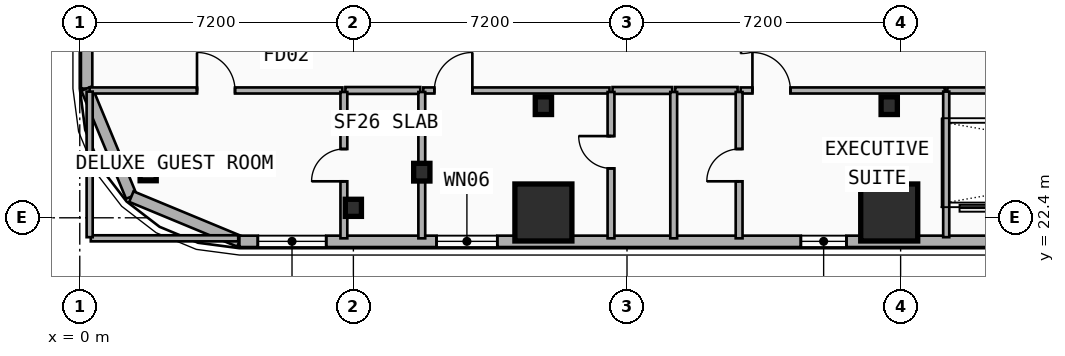
"""IFC4 building model, lengths in metres.
Left out: names, types, materials, properties, quantities, classifications, styles, units other than length and angle.
Written with IfcOpenShell. Run it as: python <this file> out.ifc"""

import sys

from ifc_helpers import new_model, si_unit, direction, frame, frame_2d, origin, origin_2d, place, context, subcontext, project, spatial, rectangle, i_section, extrude, element, fill, save


model = new_model("IFC4")
c1 = context("Model", 3, precision=1e-05, world=origin(), true_north=direction((0.0, 1.0)))
c2 = subcontext(c1, "Body", "Model", "MODEL_VIEW")
j1 = project(units=[si_unit("LENGTHUNIT", "METRE"), si_unit("PLANEANGLEUNIT", "RADIAN")], contexts=[c1])
p1 = place(None, origin())
s1 = spatial("IfcSite", under=j1, at=p1, CompositionType="ELEMENT")
p2 = place(p1, origin())
s2 = spatial("IfcBuilding", under=s1, at=p2, CompositionType="ELEMENT")
p3 = place(p2, frame((0.0, 0.0, 39.5)))
s3 = spatial("IfcBuildingStorey", under=s2, at=p3, CompositionType="ELEMENT", Elevation=39.5)
for number, where, z_axis, x_axis in (
    (1, (12.2, 25.35, 0.0), (0.0, 0.0, 1.0), (1.0, 0.0, 0.0)),
    (2, (21.3, 25.35, 0.0), (0.0, 0.0, 1.0), (1.0, 0.0, 0.0)),
):
    element("IfcColumn", number, at=place(p3, frame(where, z_axis=z_axis, x_axis=x_axis)), inside=s3, PredefinedType="COLUMN", context=c2, shape_type="SweptSolid", body=[
        extrude(i_section(OverallWidth=0.428, OverallDepth=0.465, WebThickness=0.045, FlangeThickness=0.073, FilletRadius=0.015, at=origin_2d()), origin(), (0.0, 0.0, 1.0), 3.5),
    ])
for number, where, z_axis, x_axis in (
    (3, (12.2, 22.648, 0.0), (0.0, -0.09, 0.996), (1.0, 0.0, 0.0)),
    (4, (21.3, 22.648, 0.0), (0.0, -0.09, 0.996), (1.0, 0.0, 0.0)),
):
    element("IfcColumn", number, at=place(p3, frame(where, z_axis=z_axis, x_axis=x_axis)), inside=s3, PredefinedType="COLUMN", context=c2, shape_type="SweptSolid", body=[
        extrude(rectangle(XDim=1.5, YDim=1.5, at=origin_2d()), origin(), (0.0, 0.0, 1.0), 3.514),
    ])
p4 = place(p3, frame((9.0, 23.6, 0.0), z_axis=(0.0, 0.0, 1.0), x_axis=(1.0, 0.0, 0.0)))
e5 = element("IfcColumn", 5, at=p4, inside=s3, PredefinedType="COLUMN", context=c2, shape_type="SweptSolid", body=[
    extrude(i_section(OverallWidth=0.428, OverallDepth=0.465, WebThickness=0.045, FlangeThickness=0.073, FilletRadius=0.015, at=origin_2d()), origin(), (0.0, 0.0, 1.0), 3.5),
])
p5 = place(p3, frame((1.8, 23.6, 0.0), z_axis=(0.0, 0.0, 1.0), x_axis=(1.0, 0.0, 0.0)))
e6 = element("IfcColumn", 6, at=p5, inside=s3, PredefinedType="COLUMN", context=c2, shape_type="SweptSolid", body=[
    extrude(i_section(OverallWidth=0.424, OverallDepth=0.45, WebThickness=0.041, FlangeThickness=0.065, FilletRadius=0.015, at=origin_2d()), origin(), (0.0, 0.0, 1.0), 3.5),
])
p6 = place(p3, frame((7.2, 22.758, 0.0), z_axis=(0.0, -0.079891690793, 0.996803550226), x_axis=(1.0, 0.0, 0.0)))
e7 = element("IfcColumn", 7, at=p6, inside=s3, PredefinedType="COLUMN", context=c2, shape_type="SweptSolid", body=[
    extrude(i_section(OverallWidth=0.424, OverallDepth=0.45, WebThickness=0.041, FlangeThickness=0.065, FilletRadius=0.015, at=origin_2d()), origin(), (0.0, 0.0, 1.0), 3.511),
])
p7 = place(p3, frame((0.18, 25.8, 0.0), z_axis=(0.0, 0.0, 1.0), x_axis=(0.0, 1.0, 0.0)))
e8 = element("IfcWall", 8, at=p7, inside=s3, PredefinedType="SOLIDWALL", context=c2, shape_type="SweptSolid", body=[
    extrude(rectangle(XDim=15.2, YDim=0.3, at=frame_2d((7.6, 0.0))), origin(), (0.0, 0.0, 1.0), 3.24),
])
p8 = place(p7, frame((2.67, 0.0, 0.48)))
e9 = element("IfcOpeningElement", 9, at=p8, cuts=e8, PredefinedType="OPENING", context=c2, shape_type="SweptSolid", body=[
    extrude(rectangle(XDim=1.4, YDim=1.8, at=frame_2d((0.7, 0.9))), frame((0.0, 0.16, 0.0), z_axis=(0.0, -1.0, 0.0), x_axis=(1.0, 0.0, 0.0)), (0.0, 0.0, 1.0), 0.32),
])
p9 = place(p7, frame((7.709, 0.0, 0.48)))
e10 = element("IfcOpeningElement", 10, at=p9, cuts=e8, PredefinedType="OPENING", context=c2, shape_type="SweptSolid", body=[
    extrude(rectangle(XDim=1.4, YDim=1.8, at=frame_2d((0.7, 0.9))), frame((0.0, 0.16, 0.0), z_axis=(0.0, -1.0, 0.0), x_axis=(1.0, 0.0, 0.0)), (0.0, 0.0, 1.0), 0.32),
])
for number, where, z_axis, x_axis in (
    (11, (1.357, 22.958, 0.0), (0.0, 0.0, 1.0), (-0.383, 0.924, 0.0)),
    (12, (4.2, 21.78, 0.0), (0.0, 0.0, 1.0), (-0.924, 0.383, 0.0)),
):
    element("IfcWall", number, at=place(p3, frame(where, z_axis=z_axis, x_axis=x_axis)), inside=s3, PredefinedType="SOLIDWALL", context=c2, shape_type="SweptSolid", body=[
        extrude(rectangle(XDim=3.077, YDim=0.3, at=frame_2d((1.538, 0.0))), origin(), (0.0, 0.0, 1.0), 3.24),
    ])
p10 = place(p3, frame((53.4, 21.78, 0.0), z_axis=(0.0, 0.0, 1.0), x_axis=(-1.0, 0.0, 0.0)))
e13 = element("IfcWall", 13, at=p10, inside=s3, PredefinedType="SOLIDWALL", context=c2, shape_type="SweptSolid", body=[
    extrude(rectangle(XDim=49.2, YDim=0.3, at=frame_2d((24.6, 0.0))), origin(), (0.0, 0.0, 1.0), 3.24),
])
p11 = place(p10, frame((46.915, 0.0, 0.65)))
e14 = element("IfcOpeningElement", 14, at=p11, cuts=e13, PredefinedType="OPENING", context=c2, shape_type="SweptSolid", body=[
    extrude(rectangle(XDim=1.8, YDim=1.8, at=frame_2d((0.9, 0.9))), frame((0.0, 0.16, 0.0), z_axis=(0.0, -1.0, 0.0), x_axis=(1.0, 0.0, 0.0)), (0.0, 0.0, 1.0), 0.32),
])
p12 = place(p10, frame((42.413, 0.0, 0.48)))
e15 = element("IfcOpeningElement", 15, at=p12, cuts=e13, PredefinedType="OPENING", context=c2, shape_type="SweptSolid", body=[
    extrude(rectangle(XDim=1.6, YDim=1.95, at=frame_2d((0.8, 0.975))), frame((0.0, 0.16, 0.0), z_axis=(0.0, -1.0, 0.0), x_axis=(1.0, 0.0, 0.0)), (0.0, 0.0, 1.0), 0.32),
])
p13 = place(p10, frame((33.226, 0.0, 0.48)))
e16 = element("IfcOpeningElement", 16, at=p13, cuts=e13, PredefinedType="OPENING", context=c2, shape_type="SweptSolid", body=[
    extrude(rectangle(XDim=1.2, YDim=1.5, at=frame_2d((0.6, 0.75))), frame((0.0, 0.16, 0.0), z_axis=(0.0, -1.0, 0.0), x_axis=(1.0, 0.0, 0.0)), (0.0, 0.0, 1.0), 0.32),
])
p14 = place(p10, frame((14.373, 0.0, 1.48)))
e17 = element("IfcOpeningElement", 17, at=p14, cuts=e13, PredefinedType="OPENING", context=c2, shape_type="SweptSolid", body=[
    extrude(rectangle(XDim=1.1, YDim=1.05, at=frame_2d((0.55, 0.525))), frame((0.0, 0.16, 0.0), z_axis=(0.0, -1.0, 0.0), x_axis=(1.0, 0.0, 0.0)), (0.0, 0.0, 1.0), 0.32),
])
p15 = place(p10, frame((5.187, 0.0, 0.48)))
e18 = element("IfcOpeningElement", 18, at=p15, cuts=e13, PredefinedType="OPENING", context=c2, shape_type="SweptSolid", body=[
    extrude(rectangle(XDim=1.6, YDim=1.95, at=frame_2d((0.8, 0.975))), frame((0.0, 0.16, 0.0), z_axis=(0.0, -1.0, 0.0), x_axis=(1.0, 0.0, 0.0)), (0.0, 0.0, 1.0), 0.32),
])
p16 = place(p10, frame((0.485, 0.0, 0.65)))
e19 = element("IfcOpeningElement", 19, at=p16, cuts=e13, PredefinedType="OPENING", context=c2, shape_type="SweptSolid", body=[
    extrude(rectangle(XDim=1.8, YDim=1.8, at=frame_2d((0.9, 0.9))), frame((0.0, 0.16, 0.0), z_axis=(0.0, -1.0, 0.0), x_axis=(1.0, 0.0, 0.0)), (0.0, 0.0, 1.0), 0.32),
])
p17 = place(p3, frame((0.26, 25.75, 0.0), z_axis=(0.0, 0.0, 1.0), x_axis=(1.0, 0.0, 0.0)))
e20 = element("IfcWall", 20, at=p17, inside=s3, PredefinedType="PARTITIONING", context=c2, shape_type="SweptSolid", body=[
    extrude(rectangle(XDim=6.65, YDim=0.16, at=frame_2d((3.325, 0.0))), origin(), (0.0, 0.0, 1.0), 2.57),
])
p18 = place(p17, frame((2.825, 0.0, 0.0)))
e21 = element("IfcOpeningElement", 21, at=p18, cuts=e20, PredefinedType="OPENING", context=c2, shape_type="SweptSolid", body=[
    extrude(rectangle(XDim=1.0, YDim=2.15, at=frame_2d((0.5, 1.075))), frame((0.0, 0.09, 0.0), z_axis=(0.0, -1.0, 0.0), x_axis=(1.0, 0.0, 0.0)), (0.0, 0.0, 1.0), 0.18),
])
p19 = place(p3, frame((6.99, 25.75, 0.0), z_axis=(0.0, 0.0, 1.0), x_axis=(1.0, 0.0, 0.0)))
e22 = element("IfcWall", 22, at=p19, inside=s3, PredefinedType="PLUMBINGWALL", context=c2, shape_type="SweptSolid", body=[
    extrude(rectangle(XDim=1.97, YDim=0.18, at=frame_2d((0.985, 0.0))), origin(), (0.0, 0.0, 1.0), 2.57),
])
p20 = place(p3, frame((9.04, 25.75, 0.0), z_axis=(0.0, 0.0, 1.0), x_axis=(1.0, 0.0, 0.0)))
e23 = element("IfcWall", 23, at=p20, inside=s3, PredefinedType="PARTITIONING", context=c2, shape_type="SweptSolid", body=[
    extrude(rectangle(XDim=4.899, YDim=0.16, at=frame_2d((2.449, 0.0))), origin(), (0.0, 0.0, 1.0), 2.28),
])
p21 = place(p20, frame((0.291, 0.0, 0.0)))
e24 = element("IfcOpeningElement", 24, at=p21, cuts=e23, PredefinedType="OPENING", context=c2, shape_type="SweptSolid", body=[
    extrude(rectangle(XDim=1.0, YDim=2.15, at=frame_2d((0.5, 1.075))), frame((0.0, 0.09, 0.0), z_axis=(0.0, -1.0, 0.0), x_axis=(1.0, 0.0, 0.0)), (0.0, 0.0, 1.0), 0.18),
])
p22 = place(p3, frame((14.019, 25.75, 0.0), z_axis=(0.0, 0.0, 1.0), x_axis=(1.0, 0.0, 0.0)))
e25 = element("IfcWall", 25, at=p22, inside=s3, PredefinedType="PLUMBINGWALL", context=c2, shape_type="SweptSolid", body=[
    extrude(rectangle(XDim=1.57, YDim=0.18, at=frame_2d((0.785, 0.0))), origin(), (0.0, 0.0, 1.0), 3.24),
])
p23 = place(p3, frame((17.39, 25.75, 0.0), z_axis=(0.0, 0.0, 1.0), x_axis=(1.0, 0.0, 0.0)))
e26 = element("IfcWall", 26, at=p23, inside=s3, PredefinedType="PARTITIONING", context=c2, shape_type="SweptSolid", body=[
    extrude(rectangle(XDim=5.37, YDim=0.16, at=frame_2d((2.685, 0.0))), origin(), (0.0, 0.0, 1.0), 2.28),
])
p24 = place(p23, frame((0.31, 0.0, 0.0)))
e27 = element("IfcOpeningElement", 27, at=p24, cuts=e26, PredefinedType="OPENING", context=c2, shape_type="SweptSolid", body=[
    extrude(rectangle(XDim=1.0, YDim=2.15, at=frame_2d((0.5, 1.075))), frame((0.0, 0.09, 0.0), z_axis=(0.0, -1.0, 0.0), x_axis=(1.0, 0.0, 0.0)), (0.0, 0.0, 1.0), 0.18),
])
p25 = place(p3, frame((15.669, 25.75, 0.0), z_axis=(0.0, 0.0, 1.0), x_axis=(1.0, 0.0, 0.0)))
e28 = element("IfcWall", 28, at=p25, inside=s3, PredefinedType="PLUMBINGWALL", context=c2, shape_type="SweptSolid", body=[
    extrude(rectangle(XDim=1.641, YDim=0.18, at=frame_2d((0.821, 0.0))), origin(), (0.0, 0.0, 1.0), 3.24),
])
p26 = place(p3, frame((6.95, 21.86, 0.0), z_axis=(0.0, 0.0, 1.0), x_axis=(0.0, 1.0, 0.0)))
e29 = element("IfcWall", 29, at=p26, inside=s3, PredefinedType="PLUMBINGWALL", context=c2, shape_type="SweptSolid", body=[
    extrude(rectangle(XDim=3.85, YDim=0.18, at=frame_2d((1.925, 0.0))), origin(), (0.0, 0.0, 1.0), 2.57),
])
p27 = place(p26, frame((1.5, 0.0, 0.0)))
e30 = element("IfcOpeningElement", 30, at=p27, cuts=e29, PredefinedType="OPENING", context=c2, shape_type="SweptSolid", body=[
    extrude(rectangle(XDim=0.85, YDim=2.1, at=frame_2d((0.425, 1.05))), frame((0.0, 0.1, 0.0), z_axis=(0.0, -1.0, 0.0), x_axis=(1.0, 0.0, 0.0)), (0.0, 0.0, 1.0), 0.2),
])
p28 = place(p3, frame((9.0, 21.86, 0.0), z_axis=(0.0, 0.0, 1.0), x_axis=(0.0, 1.0, 0.0)))
e31 = element("IfcWall", 31, at=p28, inside=s3, PredefinedType="PLUMBINGWALL", context=c2, shape_type="SweptSolid", body=[
    extrude(rectangle(XDim=3.85, YDim=0.18, at=frame_2d((1.925, 0.0))), origin(), (0.0, 0.0, 1.0), 2.72),
])
p29 = place(p3, frame((13.979, 21.86, 0.0), z_axis=(0.0, 0.0, 1.0), x_axis=(0.0, 1.0, 0.0)))
e32 = element("IfcWall", 32, at=p29, inside=s3, PredefinedType="PLUMBINGWALL", context=c2, shape_type="SweptSolid", body=[
    extrude(rectangle(XDim=3.85, YDim=0.18, at=frame_2d((1.925, 0.0))), origin(), (0.0, 0.0, 1.0), 2.82),
])
p30 = place(p29, frame((1.84, 0.0, 0.0)))
e33 = element("IfcOpeningElement", 33, at=p30, cuts=e32, PredefinedType="OPENING", context=c2, shape_type="SweptSolid", body=[
    extrude(rectangle(XDim=0.85, YDim=2.1, at=frame_2d((0.425, 1.05))), frame((0.0, 0.1, 0.0), z_axis=(0.0, -1.0, 0.0), x_axis=(1.0, 0.0, 0.0)), (0.0, 0.0, 1.0), 0.2),
])
p31 = place(p3, frame((15.629, 21.86, 0.0), z_axis=(0.0, 0.0, 1.0), x_axis=(0.0, 1.0, 0.0)))
e34 = element("IfcWall", 34, at=p31, inside=s3, PredefinedType="PLUMBINGWALL", context=c2, shape_type="SweptSolid", body=[
    extrude(rectangle(XDim=3.85, YDim=0.18, at=frame_2d((1.925, 0.0))), origin(), (0.0, 0.0, 1.0), 2.82),
])
p32 = place(p3, frame((17.35, 21.86, 0.0), z_axis=(0.0, 0.0, 1.0), x_axis=(0.0, 1.0, 0.0)))
e35 = element("IfcWall", 35, at=p32, inside=s3, PredefinedType="PLUMBINGWALL", context=c2, shape_type="SweptSolid", body=[
    extrude(rectangle(XDim=3.85, YDim=0.18, at=frame_2d((1.925, 0.0))), origin(), (0.0, 0.0, 1.0), 2.82),
])
p33 = place(p32, frame((1.5, 0.0, 0.0)))
e36 = element("IfcOpeningElement", 36, at=p33, cuts=e35, PredefinedType="OPENING", context=c2, shape_type="SweptSolid", body=[
    extrude(rectangle(XDim=0.85, YDim=2.1, at=frame_2d((0.425, 1.05))), frame((0.0, 0.1, 0.0), z_axis=(0.0, -1.0, 0.0), x_axis=(1.0, 0.0, 0.0)), (0.0, 0.0, 1.0), 0.2),
])
p34 = place(p3, frame((22.83, 25.75, 0.0), z_axis=(0.0, 0.0, 1.0), x_axis=(1.0, 0.0, 0.0)))
e37 = element("IfcWall", 37, at=p34, inside=s3, PredefinedType="PARTITIONING", context=c2, shape_type="SweptSolid", body=[
    extrude(rectangle(XDim=11.94, YDim=0.16, at=frame_2d((5.97, 0.0))), origin(), (0.0, 0.0, 1.0), 3.24),
])
p35 = place(p3, frame((0.29, 21.86, 0.0), z_axis=(0.0, 0.0, 1.0), x_axis=(1.0, 0.0, 0.0)))
e38 = element("IfcWall", 38, at=p35, inside=s3, PredefinedType="PARTITIONING", context=c2, shape_type="SweptSolid", body=[
    extrude(rectangle(XDim=3.88, YDim=0.16, at=frame_2d((1.94, 0.0))), origin(), (0.0, 0.0, 1.0), 3.24),
])
p36 = place(p3, frame((0.26, 21.89, 0.0), z_axis=(0.0, 0.0, 1.0), x_axis=(0.0, 1.0, 0.0)))
e39 = element("IfcWall", 39, at=p36, inside=s3, PredefinedType="PARTITIONING", context=c2, shape_type="SweptSolid", body=[
    extrude(rectangle(XDim=3.83, YDim=0.16, at=frame_2d((1.915, 0.0))), origin(), (0.0, 0.0, 1.0), 3.24),
])
p37 = place(p3, frame((22.8, 21.89, 0.0), z_axis=(0.0, 0.0, 1.0), x_axis=(0.0, 1.0, 0.0)))
e40 = element("IfcWall", 40, at=p37, inside=s3, PredefinedType="PARTITIONING", context=c2, shape_type="SweptSolid", body=[
    extrude(rectangle(XDim=3.83, YDim=0.16, at=frame_2d((1.915, 0.0))), origin(), (0.0, 0.0, 1.0), 2.82),
])
p38 = place(p11, origin())
e41 = element("IfcWindow", 41, at=p38, inside=s3, PartitioningType="SINGLE_PANEL", PredefinedType="WINDOW", context=c2, shape_type="SweptSolid", body=[
    extrude(rectangle(XDim=1.8, YDim=1.8, at=frame_2d((0.9, 0.9))), frame((0.0, 0.03, 0.0), z_axis=(0.0, -1.0, 0.0), x_axis=(1.0, 0.0, 0.0)), (0.0, 0.0, 1.0), 0.06),
])
fill(e14, e41)
p39 = place(p12, origin())
e42 = element("IfcWindow", 42, at=p39, inside=s3, PartitioningType="SINGLE_PANEL", PredefinedType="WINDOW", context=c2, shape_type="SweptSolid", body=[
    extrude(rectangle(XDim=1.6, YDim=1.95, at=frame_2d((0.8, 0.975))), frame((0.0, 0.03, 0.0), z_axis=(0.0, -1.0, 0.0), x_axis=(1.0, 0.0, 0.0)), (0.0, 0.0, 1.0), 0.06),
])
fill(e15, e42)
p40 = place(p13, origin())
e43 = element("IfcWindow", 43, at=p40, inside=s3, PartitioningType="SINGLE_PANEL", PredefinedType="WINDOW", context=c2, shape_type="SweptSolid", body=[
    extrude(rectangle(XDim=1.2, YDim=1.5, at=frame_2d((0.6, 0.75))), frame((0.0, 0.03, 0.0), z_axis=(0.0, -1.0, 0.0), x_axis=(1.0, 0.0, 0.0)), (0.0, 0.0, 1.0), 0.06),
])
fill(e16, e43)
p41 = place(p18, origin())
e44 = element("IfcDoor", 44, at=p41, inside=s3, OperationType="SINGLE_SWING_LEFT", PredefinedType="DOOR", context=c2, shape_type="SweptSolid", body=[
    extrude(rectangle(XDim=1.0, YDim=2.15, at=frame_2d((0.5, 1.075))), frame((0.0, 0.025, 0.0), z_axis=(0.0, -1.0, 0.0), x_axis=(1.0, 0.0, 0.0)), (0.0, 0.0, 1.0), 0.05),
])
fill(e21, e44)
p42 = place(p21, origin())
e45 = element("IfcDoor", 45, at=p42, inside=s3, OperationType="SINGLE_SWING_RIGHT", PredefinedType="DOOR", context=c2, shape_type="SweptSolid", body=[
    extrude(rectangle(XDim=1.0, YDim=2.15, at=frame_2d((0.5, 1.075))), frame((0.0, 0.025, 0.0), z_axis=(0.0, -1.0, 0.0), x_axis=(1.0, 0.0, 0.0)), (0.0, 0.0, 1.0), 0.05),
])
fill(e24, e45)
p43 = place(p24, origin())
e46 = element("IfcDoor", 46, at=p43, inside=s3, OperationType="SINGLE_SWING_LEFT", PredefinedType="DOOR", context=c2, shape_type="SweptSolid", body=[
    extrude(rectangle(XDim=1.0, YDim=2.15, at=frame_2d((0.5, 1.075))), frame((0.0, 0.025, 0.0), z_axis=(0.0, -1.0, 0.0), x_axis=(1.0, 0.0, 0.0)), (0.0, 0.0, 1.0), 0.05),
])
fill(e27, e46)
p44 = place(p27, origin())
e47 = element("IfcDoor", 47, at=p44, inside=s3, OperationType="SINGLE_SWING_LEFT", PredefinedType="DOOR", context=c2, shape_type="SweptSolid", body=[
    extrude(rectangle(XDim=0.85, YDim=2.1, at=frame_2d((0.425, 1.05))), frame((0.0, 0.025, 0.0), z_axis=(0.0, -1.0, 0.0), x_axis=(1.0, 0.0, 0.0)), (0.0, 0.0, 1.0), 0.05),
])
fill(e30, e47)
p45 = place(p30, origin())
e48 = element("IfcDoor", 48, at=p45, inside=s3, OperationType="SINGLE_SWING_RIGHT", PredefinedType="DOOR", context=c2, shape_type="SweptSolid", body=[
    extrude(rectangle(XDim=0.85, YDim=2.1, at=frame_2d((0.425, 1.05))), frame((0.0, 0.025, 0.0), z_axis=(0.0, -1.0, 0.0), x_axis=(1.0, 0.0, 0.0)), (0.0, 0.0, 1.0), 0.05),
])
fill(e33, e48)
p46 = place(p33, origin())
e49 = element("IfcDoor", 49, at=p46, inside=s3, OperationType="SINGLE_SWING_LEFT", PredefinedType="DOOR", context=c2, shape_type="SweptSolid", body=[
    extrude(rectangle(XDim=0.85, YDim=2.1, at=frame_2d((0.425, 1.05))), frame((0.0, 0.025, 0.0), z_axis=(0.0, -1.0, 0.0), x_axis=(1.0, 0.0, 0.0)), (0.0, 0.0, 1.0), 0.05),
])
fill(e36, e49)
save(model, sys.argv[1])
